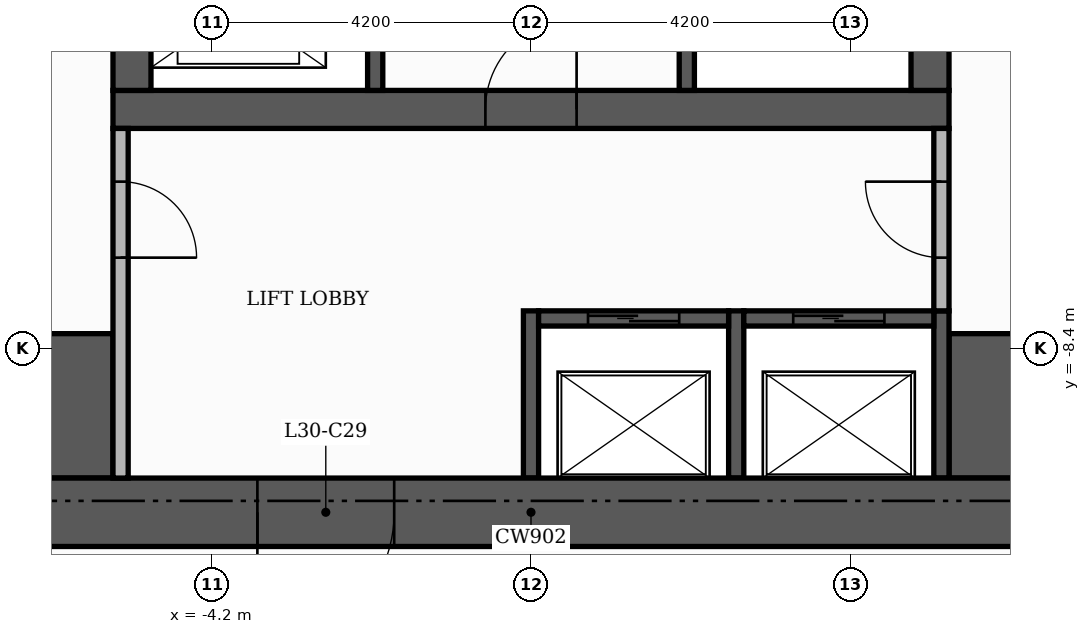
"""IFC4 building model, lengths in metres.
Left out: names, types, materials, properties, quantities, classifications, styles, units other than length and angle.
Written with IfcOpenShell. Run it as: python <this file> out.ifc"""

import sys

from ifc_helpers import new_model, si_unit, direction, frame, frame_2d, origin, place, context, subcontext, project, spatial, rectangle, extrude, element, fill, save


model = new_model("IFC4")
c1 = context("Model", 3, precision=1e-05, world=origin(), true_north=direction((0.0, 1.0)))
c2 = subcontext(c1, "Body", "Model", "MODEL_VIEW")
j1 = project(units=[si_unit("LENGTHUNIT", "METRE"), si_unit("PLANEANGLEUNIT", "RADIAN")], contexts=[c1])
p1 = place(None, origin())
s1 = spatial("IfcSite", under=j1, at=p1, CompositionType="ELEMENT")
p2 = place(p1, origin())
s2 = spatial("IfcBuilding", under=s1, at=p2, CompositionType="ELEMENT")
p3 = place(p2, frame((0.0, 0.0, 126.0)))
s3 = spatial("IfcBuildingStorey", under=s2, at=p3, CompositionType="ELEMENT", Elevation=126.0)
p4 = place(p3, frame((-5.5, -5.25, 0.0), z_axis=(0.0, 0.0, 1.0), x_axis=(1.0, 0.0, 0.0)))
e1 = element("IfcWall", 1, at=p4, inside=s3, PredefinedType="SHEAR", context=c2, shape_type="SweptSolid", body=[
    extrude(rectangle(XDim=11.0, YDim=0.5, at=frame_2d((5.5, 0.0))), origin(), (0.0, 0.0, 1.0), 7.38),
])
p5 = place(p4, frame((4.9, 0.0, 0.0)))
e2 = element("IfcOpeningElement", 2, at=p5, cuts=e1, PredefinedType="OPENING", context=c2, shape_type="SweptSolid", body=[
    extrude(rectangle(XDim=1.2, YDim=2.1, at=frame_2d((0.6, 1.05))), frame((0.0, 0.26, 0.0), z_axis=(0.0, -1.0, 0.0), x_axis=(1.0, 0.0, 0.0)), (0.0, 0.0, 1.0), 0.52),
])
for number, where, z_axis, x_axis in (
    (3, (-5.25, -5.0, 0.0), (0.0, 0.0, 1.0), (0.0, 1.0, 0.0)),
    (4, (5.25, -5.0, 0.0), (0.0, 0.0, 1.0), (0.0, 1.0, 0.0)),
):
    element("IfcWall", number, at=place(p3, frame(where, z_axis=z_axis, x_axis=x_axis)), inside=s3, PredefinedType="SHEAR", context=c2, shape_type="SweptSolid", body=[
        extrude(rectangle(XDim=10.5, YDim=0.5, at=frame_2d((5.25, 0.0))), origin(), (0.0, 0.0, 1.0), 7.38),
    ])
for number, where, z_axis, x_axis in (
    (5, (-10.1, -9.15, 0.0), (0.0, 0.0, 1.0), (1.0, 0.0, 0.0)),
    (6, (5.5, -9.15, 0.0), (0.0, 0.0, 1.0), (1.0, 0.0, 0.0)),
):
    element("IfcWall", number, at=place(p3, frame(where, z_axis=z_axis, x_axis=x_axis)), inside=s3, PredefinedType="SHEAR", context=c2, shape_type="SweptSolid", body=[
        extrude(rectangle(XDim=4.6, YDim=1.9, at=frame_2d((2.3, 0.0))), origin(), (0.0, 0.0, 1.0), 7.38),
    ])
p6 = place(p3, frame((2.05, -5.0, 0.0), z_axis=(0.0, 0.0, 1.0), x_axis=(0.0, 1.0, 0.0)))
e7 = element("IfcWall", 7, at=p6, inside=s3, PredefinedType="SHEAR", context=c2, shape_type="SweptSolid", body=[
    extrude(rectangle(XDim=6.6, YDim=0.2, at=frame_2d((3.3, 0.0))), origin(), (0.0, 0.0, 1.0), 7.38),
])
p7 = place(p6, frame((5.25, 0.0, 0.0)))
e8 = element("IfcOpeningElement", 8, at=p7, cuts=e7, PredefinedType="OPENING", context=c2, shape_type="SweptSolid", body=[
    extrude(rectangle(XDim=1.0, YDim=2.1, at=frame_2d((0.5, 1.05))), frame((0.0, 0.11, 0.0), z_axis=(0.0, -1.0, 0.0), x_axis=(1.0, 0.0, 0.0)), (0.0, 0.0, 1.0), 0.22),
])
for number, where, z_axis, x_axis in (
    (9, (0.0, -10.1, 0.0), (0.0, 0.0, 1.0), (0.0, 1.0, 0.0)),
    (10, (2.7, -10.1, 0.0), (0.0, 0.0, 1.0), (0.0, 1.0, 0.0)),
    (11, (5.4, -10.1, 0.0), (0.0, 0.0, 1.0), (0.0, 1.0, 0.0)),
):
    element("IfcWall", number, at=place(p3, frame(where, z_axis=z_axis, x_axis=x_axis)), inside=s3, PredefinedType="SHEAR", context=c2, shape_type="SweptSolid", body=[
        extrude(rectangle(XDim=2.2, YDim=0.2, at=frame_2d((1.1, 0.0))), origin(), (0.0, 0.0, 1.0), 7.38),
    ])
p8 = place(p3, frame((0.1, -8.0, 0.0), z_axis=(0.0, 0.0, 1.0), x_axis=(1.0, 0.0, 0.0)))
e12 = element("IfcWall", 12, at=p8, inside=s3, PredefinedType="SHEAR", context=c2, shape_type="SweptSolid", body=[
    extrude(rectangle(XDim=2.5, YDim=0.2, at=frame_2d((1.25, 0.0))), origin(), (0.0, 0.0, 1.0), 7.38),
])
p9 = place(p8, frame((0.65, 0.0, 0.0)))
e13 = element("IfcOpeningElement", 13, at=p9, cuts=e12, PredefinedType="OPENING", context=c2, shape_type="SweptSolid", body=[
    extrude(rectangle(XDim=1.2, YDim=2.1, at=frame_2d((0.6, 1.05))), frame((0.0, 0.11, 0.0), z_axis=(0.0, -1.0, 0.0), x_axis=(1.0, 0.0, 0.0)), (0.0, 0.0, 1.0), 0.22),
])
p10 = place(p3, frame((2.8, -8.0, 0.0), z_axis=(0.0, 0.0, 1.0), x_axis=(1.0, 0.0, 0.0)))
e14 = element("IfcWall", 14, at=p10, inside=s3, PredefinedType="SHEAR", context=c2, shape_type="SweptSolid", body=[
    extrude(rectangle(XDim=2.5, YDim=0.2, at=frame_2d((1.25, 0.0))), origin(), (0.0, 0.0, 1.0), 7.38),
])
p11 = place(p10, frame((0.65, 0.0, 0.0)))
e15 = element("IfcOpeningElement", 15, at=p11, cuts=e14, PredefinedType="OPENING", context=c2, shape_type="SweptSolid", body=[
    extrude(rectangle(XDim=1.2, YDim=2.1, at=frame_2d((0.6, 1.05))), frame((0.0, 0.11, 0.0), z_axis=(0.0, -1.0, 0.0), x_axis=(1.0, 0.0, 0.0)), (0.0, 0.0, 1.0), 0.22),
])
p12 = place(p3, frame((-2.05, -5.0, 0.0), z_axis=(0.0, 0.0, 1.0), x_axis=(0.0, 1.0, 0.0)))
e16 = element("IfcWall", 16, at=p12, inside=s3, PredefinedType="SHEAR", context=c2, shape_type="SweptSolid", body=[
    extrude(rectangle(XDim=3.4, YDim=0.2, at=frame_2d((1.7, 0.0))), origin(), (0.0, 0.0, 1.0), 7.38),
])
p13 = place(p12, frame((0.55, 0.0, 0.0)))
e17 = element("IfcOpeningElement", 17, at=p13, cuts=e16, PredefinedType="OPENING", context=c2, shape_type="SweptSolid", body=[
    extrude(rectangle(XDim=1.1, YDim=2.1, at=frame_2d((0.55, 1.05))), frame((0.0, 0.11, 0.0), z_axis=(0.0, -1.0, 0.0), x_axis=(1.0, 0.0, 0.0)), (0.0, 0.0, 1.0), 0.22),
])
p14 = place(p12, frame((2.45, 0.0, 0.0)))
e18 = element("IfcOpeningElement", 18, at=p14, cuts=e16, PredefinedType="OPENING", context=c2, shape_type="SweptSolid", body=[
    extrude(rectangle(XDim=0.8, YDim=2.1, at=frame_2d((0.4, 1.05))), frame((0.0, 0.11, 0.0), z_axis=(0.0, -1.0, 0.0), x_axis=(1.0, 0.0, 0.0)), (0.0, 0.0, 1.0), 0.22),
])
p15 = place(p3, frame((-11.0, -10.55, 0.0), z_axis=(0.0, 0.0, 1.0), x_axis=(1.0, 0.0, 0.0)))
e19 = element("IfcWall", 19, at=p15, inside=s3, PredefinedType="SHEAR", context=c2, shape_type="SweptSolid", body=[
    extrude(rectangle(XDim=22.0, YDim=0.9, at=frame_2d((11.0, 0.0))), origin(), (0.0, 0.0, 1.0), 7.38),
])
p16 = place(p15, frame((7.4, 0.0, 0.0)))
e20 = element("IfcOpeningElement", 20, at=p16, cuts=e19, PredefinedType="OPENING", context=c2, shape_type="SweptSolid", body=[
    extrude(rectangle(XDim=1.8, YDim=2.2, at=frame_2d((0.9, 1.1))), frame((0.0, 0.46, 0.0), z_axis=(0.0, -1.0, 0.0), x_axis=(1.0, 0.0, 0.0)), (0.0, 0.0, 1.0), 0.92),
])
p17 = place(p3, frame((-5.4, -10.1, 0.0), z_axis=(0.0, 0.0, 1.0), x_axis=(0.0, 1.0, 0.0)))
e21 = element("IfcWall", 21, at=p17, inside=s3, PredefinedType="PARTITIONING", context=c2, shape_type="SweptSolid", body=[
    extrude(rectangle(XDim=4.6, YDim=0.2, at=frame_2d((2.3, 0.0))), origin(), (0.0, 0.0, 1.0), 7.38),
])
p18 = place(p17, frame((2.9, 0.0, 0.0)))
e22 = element("IfcOpeningElement", 22, at=p18, cuts=e21, PredefinedType="OPENING", context=c2, shape_type="SweptSolid", body=[
    extrude(rectangle(XDim=1.0, YDim=2.1, at=frame_2d((0.5, 1.05))), frame((0.0, 0.11, 0.0), z_axis=(0.0, -1.0, 0.0), x_axis=(1.0, 0.0, 0.0)), (0.0, 0.0, 1.0), 0.22),
])
p19 = place(p3, frame((5.4, -7.9, 0.0), z_axis=(0.0, 0.0, 1.0), x_axis=(0.0, 1.0, 0.0)))
e23 = element("IfcWall", 23, at=p19, inside=s3, PredefinedType="PARTITIONING", context=c2, shape_type="SweptSolid", body=[
    extrude(rectangle(XDim=2.4, YDim=0.2, at=frame_2d((1.2, 0.0))), origin(), (0.0, 0.0, 1.0), 7.38),
])
p20 = place(p19, frame((0.7, 0.0, 0.0)))
e24 = element("IfcOpeningElement", 24, at=p20, cuts=e23, PredefinedType="OPENING", context=c2, shape_type="SweptSolid", body=[
    extrude(rectangle(XDim=1.0, YDim=2.1, at=frame_2d((0.5, 1.05))), frame((0.0, 0.11, 0.0), z_axis=(0.0, -1.0, 0.0), x_axis=(1.0, 0.0, 0.0)), (0.0, 0.0, 1.0), 0.22),
])
p21 = place(p9, origin())
e25 = element("IfcDoor", 25, at=p21, inside=s3, OperationType="SLIDING_TO_LEFT", PredefinedType="DOOR", context=c2, shape_type="SweptSolid", body=[
    extrude(rectangle(XDim=1.2, YDim=2.1, at=frame_2d((0.6, 1.05))), frame((0.0, 0.025, 0.0), z_axis=(0.0, -1.0, 0.0), x_axis=(1.0, 0.0, 0.0)), (0.0, 0.0, 1.0), 0.05),
])
fill(e13, e25)
p22 = place(p11, origin())
e26 = element("IfcDoor", 26, at=p22, inside=s3, OperationType="SLIDING_TO_LEFT", PredefinedType="DOOR", context=c2, shape_type="SweptSolid", body=[
    extrude(rectangle(XDim=1.2, YDim=2.1, at=frame_2d((0.6, 1.05))), frame((0.0, 0.025, 0.0), z_axis=(0.0, -1.0, 0.0), x_axis=(1.0, 0.0, 0.0)), (0.0, 0.0, 1.0), 0.05),
])
fill(e15, e26)
p23 = place(p5, origin())
e27 = element("IfcDoor", 27, at=p23, inside=s3, OperationType="SINGLE_SWING_RIGHT", PredefinedType="DOOR", context=c2, shape_type="SweptSolid", body=[
    extrude(rectangle(XDim=1.2, YDim=2.1, at=frame_2d((0.6, 1.05))), frame((0.0, 0.025, 0.0), z_axis=(0.0, -1.0, 0.0), x_axis=(1.0, 0.0, 0.0)), (0.0, 0.0, 1.0), 0.05),
])
fill(e2, e27)
p24 = place(p18, frame((1.0, 0.0, 0.0), z_axis=(0.0, 0.0, 1.0), x_axis=(-1.0, 0.0, 0.0)))
e28 = element("IfcDoor", 28, at=p24, inside=s3, OperationType="SINGLE_SWING_LEFT", PredefinedType="DOOR", context=c2, shape_type="SweptSolid", body=[
    extrude(rectangle(XDim=1.0, YDim=2.1, at=frame_2d((0.5, 1.05))), frame((0.0, 0.025, 0.0), z_axis=(0.0, -1.0, 0.0), x_axis=(1.0, 0.0, 0.0)), (0.0, 0.0, 1.0), 0.05),
])
fill(e22, e28)
p25 = place(p20, origin())
e29 = element("IfcDoor", 29, at=p25, inside=s3, OperationType="SINGLE_SWING_RIGHT", PredefinedType="DOOR", context=c2, shape_type="SweptSolid", body=[
    extrude(rectangle(XDim=1.0, YDim=2.1, at=frame_2d((0.5, 1.05))), frame((0.0, 0.025, 0.0), z_axis=(0.0, -1.0, 0.0), x_axis=(1.0, 0.0, 0.0)), (0.0, 0.0, 1.0), 0.05),
])
fill(e24, e29)
p26 = place(p16, frame((1.8, 0.0, 0.0), z_axis=(0.0, 0.0, 1.0), x_axis=(-1.0, 0.0, 0.0)))
e30 = element("IfcDoor", 30, at=p26, inside=s3, OperationType="DOUBLE_DOOR_SINGLE_SWING", PredefinedType="DOOR", context=c2, shape_type="SweptSolid", body=[
    extrude(rectangle(XDim=1.8, YDim=2.2, at=frame_2d((0.9, 1.1))), frame((0.0, 0.025, 0.0), z_axis=(0.0, -1.0, 0.0), x_axis=(1.0, 0.0, 0.0)), (0.0, 0.0, 1.0), 0.05),
])
fill(e20, e30)
save(model, sys.argv[1])
